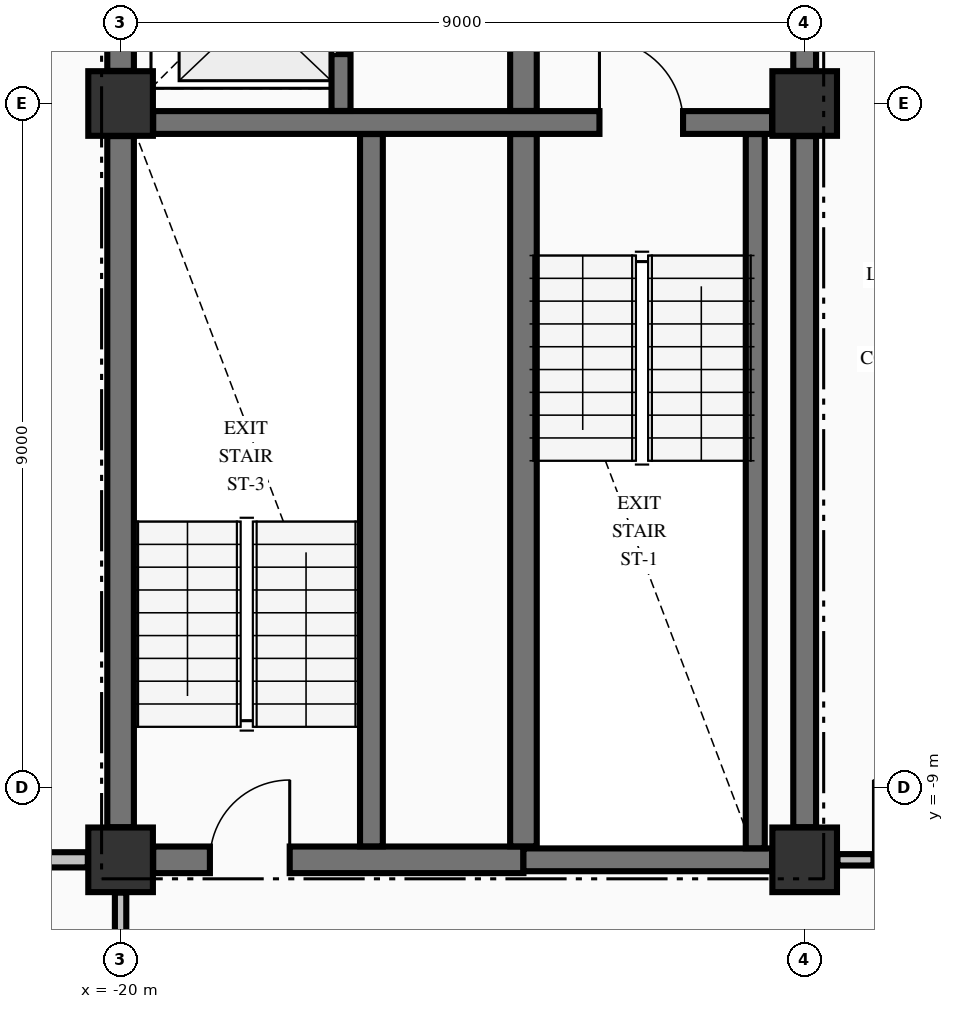
"""IFC4 building model, lengths in metres.
Left out: names, types, materials, properties, quantities, classifications, styles, units other than length and angle.
Written with IfcOpenShell. Run it as: python <this file> out.ifc"""

import sys

from ifc_helpers import new_model, si_unit, direction, frame, frame_2d, origin, origin_2d, place, context, subcontext, project, spatial, rectangle, extrude, element, fill, save


model = new_model("IFC4")
c1 = context("Model", 3, precision=1e-05, world=origin(), true_north=direction((0.0, 1.0)))
c2 = subcontext(c1, "Body", "Model", "MODEL_VIEW")
j1 = project(units=[si_unit("LENGTHUNIT", "METRE"), si_unit("PLANEANGLEUNIT", "RADIAN")], contexts=[c1])
p1 = place(None, origin())
s1 = spatial("IfcSite", under=j1, at=p1, CompositionType="ELEMENT")
p2 = place(p1, origin())
s2 = spatial("IfcBuilding", under=s1, at=p2, CompositionType="ELEMENT")
p3 = place(p2, frame((0.0, 0.0, 201.66)))
s3 = spatial("IfcBuildingStorey", under=s2, at=p3, CompositionType="ELEMENT", Elevation=201.66)
for number, where, z_axis, x_axis in (
    (1, (-20.0, -9.95, -0.25), (0.0, 0.0, 1.0), (1.0, 0.0, 0.0)),
    (2, (-11.0, -9.95, -0.25), (0.0, 0.0, 1.0), (1.0, 0.0, 0.0)),
    (3, (-11.0, 0.0, -0.25), (0.0, 0.0, 1.0), (1.0, 0.0, 0.0)),
    (4, (-20.0, 0.0, -0.25), (0.0, 0.0, 1.0), (1.0, 0.0, 0.0)),
):
    element("IfcColumn", number, at=place(p3, frame(where, z_axis=z_axis, x_axis=x_axis)), inside=s3, PredefinedType="COLUMN", context=c2, shape_type="SweptSolid", body=[
        extrude(rectangle(XDim=0.85, YDim=0.85, at=origin_2d()), origin(), (0.0, 0.0, 1.0), 3.4),
    ])
p4 = place(p3, frame((-19.571, -9.95, 0.0), z_axis=(0.0, 0.0, 1.0), x_axis=(1.0, 0.0, 0.0)))
e5 = element("IfcWall", 5, at=p4, inside=s3, PredefinedType="SHEAR", context=c2, shape_type="SweptSolid", body=[
    extrude(rectangle(XDim=4.871, YDim=0.35, at=frame_2d((2.436, 0.0))), origin(), (0.0, 0.0, 1.0), 3.15),
])
p5 = place(p4, frame((0.746, 0.0, 0.0)))
e6 = element("IfcOpeningElement", 6, at=p5, cuts=e5, PredefinedType="OPENING", context=c2, shape_type="SweptSolid", body=[
    extrude(rectangle(XDim=1.05, YDim=2.15, at=frame_2d((0.525, 1.075))), frame((0.0, 0.185, 0.0), z_axis=(0.0, -1.0, 0.0), x_axis=(1.0, 0.0, 0.0)), (0.0, 0.0, 1.0), 0.37),
])
p6 = place(p3, frame((-14.7, -9.95, 0.0), z_axis=(0.0, 0.0, 1.0), x_axis=(1.0, 0.0, 0.0)))
e7 = element("IfcWall", 7, at=p6, inside=s3, PredefinedType="SHEAR", context=c2, shape_type="SweptSolid", body=[
    extrude(rectangle(XDim=3.271, YDim=0.3, at=frame_2d((1.635, 0.0))), origin(), (0.0, 0.0, 1.0), 3.15),
])
p7 = place(p3, frame((-19.571, -0.25, 0.0), z_axis=(0.0, 0.0, 1.0), x_axis=(1.0, 0.0, 0.0)))
e8 = element("IfcWall", 8, at=p7, inside=s3, PredefinedType="SHEAR", context=c2, shape_type="SweptSolid", body=[
    extrude(rectangle(XDim=8.142, YDim=0.3, at=frame_2d((4.071, 0.0))), origin(), (0.0, 0.0, 1.0), 3.15),
])
p8 = place(p7, frame((5.871, 0.0, 0.0)))
e9 = element("IfcOpeningElement", 9, at=p8, cuts=e8, PredefinedType="OPENING", context=c2, shape_type="SweptSolid", body=[
    extrude(rectangle(XDim=1.1, YDim=2.15, at=frame_2d((0.55, 1.075))), frame((0.0, 0.16, 0.0), z_axis=(0.0, -1.0, 0.0), x_axis=(1.0, 0.0, 0.0)), (0.0, 0.0, 1.0), 0.32),
])
p9 = place(p3, frame((-26.835, -9.95, 0.0), z_axis=(0.0, 0.0, 1.0), x_axis=(1.0, 0.0, 0.0)))
e10 = element("IfcWall", 10, at=p9, inside=s3, PredefinedType="PARTITIONING", context=c2, shape_type="SweptSolid", body=[
    extrude(rectangle(XDim=6.404, YDim=0.2, at=frame_2d((3.202, 0.0))), origin(), (0.0, 0.0, 1.0), 3.15),
])
p10 = place(p3, frame((-10.569, -9.95, 0.0), z_axis=(0.0, 0.0, 1.0), x_axis=(1.0, 0.0, 0.0)))
e11 = element("IfcWall", 11, at=p10, inside=s3, PredefinedType="PARTITIONING", context=c2, shape_type="SweptSolid", body=[
    extrude(rectangle(XDim=21.138, YDim=0.15, at=frame_2d((10.569, 0.0))), origin(), (0.0, 0.0, 1.0), 3.15),
])
p11 = place(p10, frame((0.474, 0.0, 0.0)))
e12 = element("IfcOpeningElement", 12, at=p11, cuts=e11, PredefinedType="OPENING", context=c2, shape_type="SweptSolid", body=[
    extrude(rectangle(XDim=1.05, YDim=2.15, at=frame_2d((0.525, 1.075))), frame((0.0, 0.085, 0.0), z_axis=(0.0, -1.0, 0.0), x_axis=(1.0, 0.0, 0.0)), (0.0, 0.0, 1.0), 0.17),
])
p12 = place(p10, frame((19.614, 0.0, 0.0)))
e13 = element("IfcOpeningElement", 13, at=p12, cuts=e11, PredefinedType="OPENING", context=c2, shape_type="SweptSolid", body=[
    extrude(rectangle(XDim=1.05, YDim=2.15, at=frame_2d((0.525, 1.075))), frame((0.0, 0.085, 0.0), z_axis=(0.0, -1.0, 0.0), x_axis=(1.0, 0.0, 0.0)), (0.0, 0.0, 1.0), 0.17),
])
p13 = place(p10, frame((13.574, 0.0, 0.0)))
e14 = element("IfcOpeningElement", 14, at=p13, cuts=e11, PredefinedType="OPENING", context=c2, shape_type="SweptSolid", body=[
    extrude(rectangle(XDim=0.95, YDim=2.15, at=frame_2d((0.475, 1.075))), frame((0.0, 0.085, 0.0), z_axis=(0.0, -1.0, 0.0), x_axis=(1.0, 0.0, 0.0)), (0.0, 0.0, 1.0), 0.17),
])
p14 = place(p3, frame((-20.0, -9.521, 0.0), z_axis=(0.0, 0.0, 1.0), x_axis=(0.0, 1.0, 0.0)))
e15 = element("IfcWall", 15, at=p14, inside=s3, PredefinedType="SHEAR", context=c2, shape_type="SweptSolid", body=[
    extrude(rectangle(XDim=9.092, YDim=0.35, at=frame_2d((4.546, 0.0))), origin(), (0.0, 0.0, 1.0), 3.15),
])
p15 = place(p3, frame((-20.0, 0.429, 0.0), z_axis=(0.0, 0.0, 1.0), x_axis=(0.0, 1.0, 0.0)))
e16 = element("IfcWall", 16, at=p15, inside=s3, PredefinedType="SHEAR", context=c2, shape_type="SweptSolid", body=[
    extrude(rectangle(XDim=2.094, YDim=0.35, at=frame_2d((1.047, 0.0))), origin(), (0.0, 0.0, 1.0), 3.15),
])
p16 = place(p3, frame((-17.1, -0.098, 0.0), z_axis=(0.0, 0.0, 1.0), x_axis=(0.0, 1.0, 0.0)))
e17 = element("IfcWall", 17, at=p16, inside=s3, PredefinedType="SOLIDWALL", context=c2, shape_type="SweptSolid", body=[
    extrude(rectangle(XDim=2.621, YDim=0.25, at=frame_2d((1.311, 0.0))), origin(), (0.0, 0.0, 1.0), 3.15),
])
p17 = place(p16, frame((0.748, 0.0, 0.0)))
e18 = element("IfcOpeningElement", 18, at=p17, cuts=e17, PredefinedType="OPENING", context=c2, shape_type="SweptSolid", body=[
    extrude(rectangle(XDim=1.1, YDim=2.2, at=frame_2d((0.55, 1.1))), frame((0.0, 0.135, 0.0), z_axis=(0.0, -1.0, 0.0), x_axis=(1.0, 0.0, 0.0)), (0.0, 0.0, 1.0), 0.27),
])
p18 = place(p3, frame((-16.7, -9.773, 0.0), z_axis=(0.0, 0.0, 1.0), x_axis=(0.0, 1.0, 0.0)))
e19 = element("IfcWall", 19, at=p18, inside=s3, PredefinedType="SHEAR", context=c2, shape_type="SweptSolid", body=[
    extrude(rectangle(XDim=9.371, YDim=0.3, at=frame_2d((4.686, 0.0))), origin(), (0.0, 0.0, 1.0), 3.15),
])
p19 = place(p3, frame((-14.7, -9.773, 0.0), z_axis=(0.0, 0.0, 1.0), x_axis=(0.0, 1.0, 0.0)))
e20 = element("IfcWall", 20, at=p19, inside=s3, PredefinedType="SHEAR", context=c2, shape_type="SweptSolid", body=[
    extrude(rectangle(XDim=9.371, YDim=0.35, at=frame_2d((4.686, 0.0))), origin(), (0.0, 0.0, 1.0), 3.15),
])
p20 = place(p3, frame((-14.7, -0.098, 0.0), z_axis=(0.0, 0.0, 1.0), x_axis=(0.0, 1.0, 0.0)))
e21 = element("IfcWall", 21, at=p20, inside=s3, PredefinedType="SHEAR", context=c2, shape_type="SweptSolid", body=[
    extrude(rectangle(XDim=2.846, YDim=0.35, at=frame_2d((1.423, 0.0))), origin(), (0.0, 0.0, 1.0), 3.15),
])
p21 = place(p3, frame((-11.65, -9.798, 0.0), z_axis=(0.0, 0.0, 1.0), x_axis=(0.0, 1.0, 0.0)))
e22 = element("IfcWall", 22, at=p21, inside=s3, PredefinedType="SOLIDWALL", context=c2, shape_type="SweptSolid", body=[
    extrude(rectangle(XDim=9.396, YDim=0.25, at=frame_2d((4.698, 0.0))), origin(), (0.0, 0.0, 1.0), 3.15),
])
p22 = place(p3, frame((-11.0, -9.521, 0.0), z_axis=(0.0, 0.0, 1.0), x_axis=(0.0, 1.0, 0.0)))
e23 = element("IfcWall", 23, at=p22, inside=s3, PredefinedType="SHEAR", context=c2, shape_type="SweptSolid", body=[
    extrude(rectangle(XDim=9.092, YDim=0.3, at=frame_2d((4.546, 0.0))), origin(), (0.0, 0.0, 1.0), 3.15),
])
p23 = place(p3, frame((-11.0, 0.429, 0.0), z_axis=(0.0, 0.0, 1.0), x_axis=(0.0, 1.0, 0.0)))
e24 = element("IfcWall", 24, at=p23, inside=s3, PredefinedType="SHEAR", context=c2, shape_type="SweptSolid", body=[
    extrude(rectangle(XDim=2.319, YDim=0.3, at=frame_2d((1.16, 0.0))), origin(), (0.0, 0.0, 1.0), 3.15),
])
p24 = place(p23, frame((0.671, 0.0, 0.0)))
e25 = element("IfcOpeningElement", 25, at=p24, cuts=e24, PredefinedType="OPENING", context=c2, shape_type="SweptSolid", body=[
    extrude(rectangle(XDim=1.1, YDim=2.15, at=frame_2d((0.55, 1.075))), frame((0.0, 0.16, 0.0), z_axis=(0.0, -1.0, 0.0), x_axis=(1.0, 0.0, 0.0)), (0.0, 0.0, 1.0), 0.32),
])
p25 = place(p3, frame((-20.0, -12.997, 0.0), z_axis=(0.0, 0.0, 1.0), x_axis=(0.0, 1.0, 0.0)))
e26 = element("IfcWall", 26, at=p25, inside=s3, PredefinedType="PARTITIONING", context=c2, shape_type="SweptSolid", body=[
    extrude(rectangle(XDim=2.616, YDim=0.15, at=frame_2d((1.308, 0.0))), origin(), (0.0, 0.0, 1.0), 2.342),
])
p26 = place(p8, origin())
e27 = element("IfcDoor", 27, at=p26, inside=s3, OperationType="SINGLE_SWING_LEFT", PredefinedType="DOOR", context=c2, shape_type="SweptSolid", body=[
    extrude(rectangle(XDim=1.1, YDim=2.15, at=frame_2d((0.55, 1.075))), frame((0.0, 0.025, 0.0), z_axis=(0.0, -1.0, 0.0), x_axis=(1.0, 0.0, 0.0)), (0.0, 0.0, 1.0), 0.05),
])
fill(e9, e27)
p27 = place(p5, origin())
e28 = element("IfcDoor", 28, at=p27, inside=s3, OperationType="SINGLE_SWING_RIGHT", PredefinedType="DOOR", context=c2, shape_type="SweptSolid", body=[
    extrude(rectangle(XDim=1.05, YDim=2.15, at=frame_2d((0.525, 1.075))), frame((0.0, 0.025, 0.0), z_axis=(0.0, -1.0, 0.0), x_axis=(1.0, 0.0, 0.0)), (0.0, 0.0, 1.0), 0.05),
])
fill(e6, e28)
p28 = place(p17, origin())
e29 = element("IfcDoor", 29, at=p28, inside=s3, OperationType="SLIDING_TO_LEFT", PredefinedType="DOOR", context=c2, shape_type="SweptSolid", body=[
    extrude(rectangle(XDim=1.1, YDim=2.2, at=frame_2d((0.55, 1.1))), frame((0.0, 0.025, 0.0), z_axis=(0.0, -1.0, 0.0), x_axis=(1.0, 0.0, 0.0)), (0.0, 0.0, 1.0), 0.05),
])
fill(e18, e29)
p29 = place(p11, origin())
e30 = element("IfcDoor", 30, at=p29, inside=s3, OperationType="SINGLE_SWING_LEFT", PredefinedType="DOOR", context=c2, shape_type="SweptSolid", body=[
    extrude(rectangle(XDim=1.05, YDim=2.15, at=frame_2d((0.525, 1.075))), frame((0.0, 0.025, 0.0), z_axis=(0.0, -1.0, 0.0), x_axis=(1.0, 0.0, 0.0)), (0.0, 0.0, 1.0), 0.05),
])
fill(e12, e30)
save(model, sys.argv[1])
